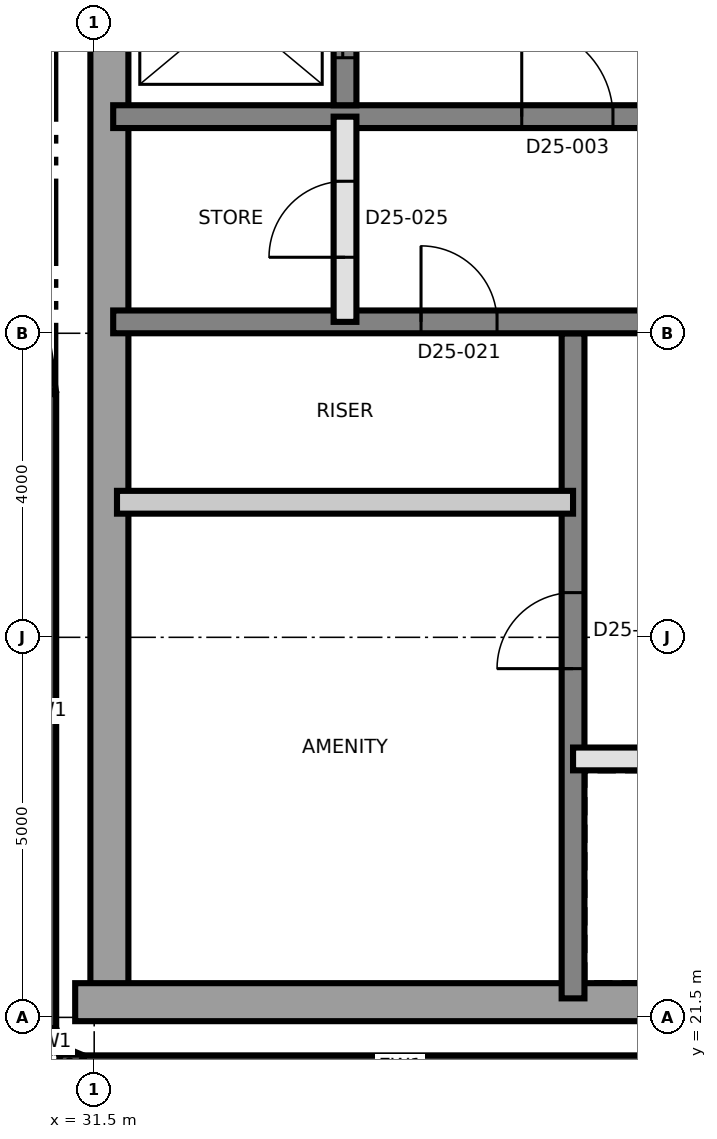
"""IFC4 building model, lengths in metres.
Left out: names, types, materials, properties, quantities, classifications, styles, units other than length and angle.
Written with IfcOpenShell. Run it as: python <this file> out.ifc"""

import sys

from ifc_helpers import new_model, si_unit, direction, frame, frame_2d, origin, place, context, subcontext, project, spatial, rectangle, extrude, element, fill, save


model = new_model("IFC4")
c1 = context("Model", 3, precision=1e-05, world=origin(), true_north=direction((0.0, 1.0)))
c2 = subcontext(c1, "Body", "Model", "MODEL_VIEW")
j1 = project(units=[si_unit("LENGTHUNIT", "METRE"), si_unit("PLANEANGLEUNIT", "RADIAN")], contexts=[c1])
p1 = place(None, origin())
s1 = spatial("IfcSite", under=j1, at=p1, CompositionType="ELEMENT")
p2 = place(p1, origin())
s2 = spatial("IfcBuilding", under=s1, at=p2, CompositionType="ELEMENT")
p3 = place(p2, frame((0.0, 0.0, 225.4)))
s3 = spatial("IfcBuildingStorey", under=s2, at=p3, CompositionType="ELEMENT", Elevation=225.4)
p4 = place(p3, frame((31.7, 21.75, 0.0), z_axis=(0.0, 0.0, 1.0), x_axis=(0.0, 1.0, 0.0)))
e1 = element("IfcWall", 1, at=p4, inside=s3, PredefinedType="SHEAR", context=c2, shape_type="SweptSolid", body=[
    extrude(rectangle(XDim=17.5, YDim=0.5, at=frame_2d((8.75, 0.0))), origin(), (0.0, 0.0, 1.0), 3.7),
])
p5 = place(p3, frame((31.25, 21.7, 0.0), z_axis=(0.0, 0.0, 1.0), x_axis=(1.0, 0.0, 0.0)))
e2 = element("IfcWall", 2, at=p5, inside=s3, PredefinedType="SHEAR", context=c2, shape_type="SweptSolid", body=[
    extrude(rectangle(XDim=27.0, YDim=0.5, at=frame_2d((13.5, 0.0))), origin(), (0.0, 0.0, 1.0), 3.7),
])
p6 = place(p3, frame((37.8, 21.75, 0.0), z_axis=(0.0, 0.0, 1.0), x_axis=(0.0, 1.0, 0.0)))
e3 = element("IfcWall", 3, at=p6, inside=s3, PredefinedType="SHEAR", context=c2, shape_type="SweptSolid", body=[
    extrude(rectangle(XDim=8.75, YDim=0.3, at=frame_2d((4.375, 0.0))), origin(), (0.0, 0.0, 1.0), 3.7),
])
p7 = place(p6, frame((4.338, 0.0, 0.0)))
e4 = element("IfcOpeningElement", 4, at=p7, cuts=e3, PredefinedType="OPENING", context=c2, shape_type="SweptSolid", body=[
    extrude(rectangle(XDim=1.0, YDim=2.1, at=frame_2d((0.5, 1.05))), frame((0.0, 0.16, 0.0), z_axis=(0.0, -1.0, 0.0), x_axis=(1.0, 0.0, 0.0)), (0.0, 0.0, 1.0), 0.32),
])
p8 = place(p3, frame((31.75, 30.65, 0.0), z_axis=(0.0, 0.0, 1.0), x_axis=(1.0, 0.0, 0.0)))
e5 = element("IfcWall", 5, at=p8, inside=s3, PredefinedType="SHEAR", context=c2, shape_type="SweptSolid", body=[
    extrude(rectangle(XDim=26.5, YDim=0.3, at=frame_2d((13.25, 0.0))), origin(), (0.0, 0.0, 1.0), 3.7),
])
p9 = place(p8, frame((24.75, 0.0, 0.0)))
e6 = element("IfcOpeningElement", 6, at=p9, cuts=e5, PredefinedType="OPENING", context=c2, shape_type="SweptSolid", body=[
    extrude(rectangle(XDim=1.0, YDim=2.1, at=frame_2d((0.5, 1.05))), frame((0.0, 0.16, 0.0), z_axis=(0.0, -1.0, 0.0), x_axis=(1.0, 0.0, 0.0)), (0.0, 0.0, 1.0), 0.32),
])
p10 = place(p8, frame((4.05, 0.0, 0.0)))
e7 = element("IfcOpeningElement", 7, at=p10, cuts=e5, PredefinedType="OPENING", context=c2, shape_type="SweptSolid", body=[
    extrude(rectangle(XDim=1.0, YDim=2.1, at=frame_2d((0.5, 1.05))), frame((0.0, 0.16, 0.0), z_axis=(0.0, -1.0, 0.0), x_axis=(1.0, 0.0, 0.0)), (0.0, 0.0, 1.0), 0.32),
])
p11 = place(p3, frame((31.75, 33.35, 0.0), z_axis=(0.0, 0.0, 1.0), x_axis=(1.0, 0.0, 0.0)))
e8 = element("IfcWall", 8, at=p11, inside=s3, PredefinedType="SHEAR", context=c2, shape_type="SweptSolid", body=[
    extrude(rectangle(XDim=26.5, YDim=0.3, at=frame_2d((13.25, 0.0))), origin(), (0.0, 0.0, 1.0), 3.7),
])
p12 = place(p11, frame((13.9, 0.0, 0.0)))
e9 = element("IfcOpeningElement", 9, at=p12, cuts=e8, PredefinedType="OPENING", context=c2, shape_type="SweptSolid", body=[
    extrude(rectangle(XDim=1.4, YDim=2.1, at=frame_2d((0.7, 1.05))), frame((0.0, 0.16, 0.0), z_axis=(0.0, -1.0, 0.0), x_axis=(1.0, 0.0, 0.0)), (0.0, 0.0, 1.0), 0.32),
])
p13 = place(p11, frame((5.375, 0.0, 0.0)))
e10 = element("IfcOpeningElement", 10, at=p13, cuts=e8, PredefinedType="OPENING", context=c2, shape_type="SweptSolid", body=[
    extrude(rectangle(XDim=1.2, YDim=2.1, at=frame_2d((0.6, 1.05))), frame((0.0, 0.16, 0.0), z_axis=(0.0, -1.0, 0.0), x_axis=(1.0, 0.0, 0.0)), (0.0, 0.0, 1.0), 0.32),
])
p14 = place(p11, frame((19.925, 0.0, 0.0)))
e11 = element("IfcOpeningElement", 11, at=p14, cuts=e8, PredefinedType="OPENING", context=c2, shape_type="SweptSolid", body=[
    extrude(rectangle(XDim=1.2, YDim=2.1, at=frame_2d((0.6, 1.05))), frame((0.0, 0.16, 0.0), z_axis=(0.0, -1.0, 0.0), x_axis=(1.0, 0.0, 0.0)), (0.0, 0.0, 1.0), 0.32),
])
p15 = place(p3, frame((34.8, 33.5, 0.0), z_axis=(0.0, 0.0, 1.0), x_axis=(0.0, 1.0, 0.0)))
e12 = element("IfcWall", 12, at=p15, inside=s3, PredefinedType="SHEAR", context=c2, shape_type="SweptSolid", body=[
    extrude(rectangle(XDim=2.55, YDim=0.3, at=frame_2d((1.275, 0.0))), origin(), (0.0, 0.0, 1.0), 3.7),
])
p16 = place(p15, frame((0.625, 0.0, 0.0)))
e13 = element("IfcOpeningElement", 13, at=p16, cuts=e12, PredefinedType="OPENING", context=c2, shape_type="SweptSolid", body=[
    extrude(rectangle(XDim=1.3, YDim=2.4, at=frame_2d((0.65, 1.2))), frame((0.0, 0.16, 0.0), z_axis=(0.0, -1.0, 0.0), x_axis=(1.0, 0.0, 0.0)), (0.0, 0.0, 1.0), 0.32),
])
p17 = place(p3, frame((30.85, 29.699, 0.0), z_axis=(0.0, 0.0, 1.0), x_axis=(0.0, -1.0, 0.0)))
e14 = element("IfcWall", 14, at=p17, inside=s3, PredefinedType="SOLIDWALL", context=c2, shape_type="SweptSolid", body=[
    extrude(rectangle(XDim=8.34, YDim=0.3, at=frame_2d((4.17, 0.0))), origin(), (0.0, 0.0, 1.0), 3.4),
])
for number, where, z_axis, x_axis in (
    (15, (30.861, 21.302, 0.0), (0.0, 0.0, 1.0), (0.383, -0.924, 0.0)),
    (16, (31.048, 20.967, 0.0), (0.0, 0.0, 1.0), (0.924, -0.383, 0.0)),
):
    element("IfcWall", number, at=place(p3, frame(where, z_axis=z_axis, x_axis=x_axis)), inside=s3, PredefinedType="SOLIDWALL", context=c2, shape_type="SweptSolid", body=[
        extrude(rectangle(XDim=0.275, YDim=0.3, at=frame_2d((0.138, 0.0))), origin(), (0.0, 0.0, 1.0), 3.4),
    ])
p18 = place(p3, frame((31.36, 20.85, 0.0), z_axis=(0.0, 0.0, 1.0), x_axis=(1.0, 0.0, 0.0)))
e17 = element("IfcWall", 17, at=p18, inside=s3, PredefinedType="SOLIDWALL", context=c2, shape_type="SweptSolid", body=[
    extrude(rectangle(XDim=8.34, YDim=0.3, at=frame_2d((4.17, 0.0))), origin(), (0.0, 0.0, 1.0), 3.4),
])
p19 = place(p3, frame((30.152, 34.0, 0.0), z_axis=(0.0, 0.0, 1.0), x_axis=(0.160697303067, -0.987003736967, 0.0)))
e18 = element("IfcWall", 18, at=p19, inside=s3, PredefinedType="SOLIDWALL", context=c2, shape_type="SweptSolid", body=[
    extrude(rectangle(XDim=4.333, YDim=0.3, at=frame_2d((2.167, 0.0))), origin(), (0.0, 0.0, 1.0), 3.4),
])
p20 = place(p19, frame((0.366, 0.0, 0.9)))
e19 = element("IfcOpeningElement", 19, at=p20, cuts=e18, PredefinedType="OPENING", context=c2, shape_type="SweptSolid", body=[
    extrude(rectangle(XDim=3.6, YDim=1.5, at=frame_2d((1.8, 0.75))), frame((0.0, 0.16, 0.0), z_axis=(0.0, -1.0, 0.0), x_axis=(1.0, 0.0, 0.0)), (0.0, 0.0, 1.0), 0.32),
])
p21 = place(p3, frame((37.8, 24.9, 0.0), z_axis=(0.0, 0.0, 1.0), x_axis=(1.0, 0.0, 0.0)))
e20 = element("IfcWall", 20, at=p21, inside=s3, PredefinedType="SOLIDWALL", context=c2, shape_type="SweptSolid", body=[
    extrude(rectangle(XDim=12.0, YDim=0.3, at=frame_2d((6.0, 0.0))), origin(), (0.0, 0.0, 1.0), 3.4),
])
p22 = place(p21, frame((1.05, 0.0, 0.0)))
e21 = element("IfcOpeningElement", 21, at=p22, cuts=e20, PredefinedType="OPENING", context=c2, shape_type="SweptSolid", body=[
    extrude(rectangle(XDim=0.9, YDim=2.1, at=frame_2d((0.45, 1.05))), frame((0.0, 0.16, 0.0), z_axis=(0.0, -1.0, 0.0), x_axis=(1.0, 0.0, 0.0)), (0.0, 0.0, 1.0), 0.32),
])
p23 = place(p21, frame((10.05, 0.0, 0.0)))
e22 = element("IfcOpeningElement", 22, at=p23, cuts=e20, PredefinedType="OPENING", context=c2, shape_type="SweptSolid", body=[
    extrude(rectangle(XDim=0.9, YDim=2.1, at=frame_2d((0.45, 1.05))), frame((0.0, 0.16, 0.0), z_axis=(0.0, -1.0, 0.0), x_axis=(1.0, 0.0, 0.0)), (0.0, 0.0, 1.0), 0.32),
])
p24 = place(p21, frame((3.95, 0.0, 0.0)))
e23 = element("IfcOpeningElement", 23, at=p24, cuts=e20, PredefinedType="OPENING", context=c2, shape_type="SweptSolid", body=[
    extrude(rectangle(XDim=1.1, YDim=2.4, at=frame_2d((0.55, 1.2))), frame((0.0, 0.16, 0.0), z_axis=(0.0, -1.0, 0.0), x_axis=(1.0, 0.0, 0.0)), (0.0, 0.0, 1.0), 0.32),
])
p25 = place(p21, frame((6.95, 0.0, 0.0)))
e24 = element("IfcOpeningElement", 24, at=p25, cuts=e20, PredefinedType="OPENING", context=c2, shape_type="SweptSolid", body=[
    extrude(rectangle(XDim=1.1, YDim=2.4, at=frame_2d((0.55, 1.2))), frame((0.0, 0.16, 0.0), z_axis=(0.0, -1.0, 0.0), x_axis=(1.0, 0.0, 0.0)), (0.0, 0.0, 1.0), 0.32),
])
p26 = place(p3, frame((31.8, 28.277, 0.0), z_axis=(0.0, 0.0, 1.0), x_axis=(1.0, 0.0, 0.0)))
e25 = element("IfcWall", 25, at=p26, inside=s3, PredefinedType="PARTITIONING", context=c2, shape_type="SweptSolid", body=[
    extrude(rectangle(XDim=6.0, YDim=0.3, at=frame_2d((3.0, 0.0))), origin(), (0.0, 0.0, 1.0), 3.4),
])
p27 = place(p3, frame((34.8, 30.65, 0.0), z_axis=(0.0, 0.0, 1.0), x_axis=(0.0, 1.0, 0.0)))
e26 = element("IfcWall", 26, at=p27, inside=s3, PredefinedType="SOLIDWALL", context=c2, shape_type="SweptSolid", body=[
    extrude(rectangle(XDim=2.7, YDim=0.3, at=frame_2d((1.35, 0.0))), origin(), (0.0, 0.0, 1.0), 3.4),
])
p28 = place(p27, frame((0.85, 0.0, 0.0)))
e27 = element("IfcOpeningElement", 27, at=p28, cuts=e26, PredefinedType="OPENING", context=c2, shape_type="SweptSolid", body=[
    extrude(rectangle(XDim=1.0, YDim=2.1, at=frame_2d((0.5, 1.05))), frame((0.0, 0.16, 0.0), z_axis=(0.0, -1.0, 0.0), x_axis=(1.0, 0.0, 0.0)), (0.0, 0.0, 1.0), 0.32),
])
p29 = place(p13, origin())
e28 = element("IfcDoor", 28, at=p29, inside=s3, OperationType="SINGLE_SWING_LEFT", PredefinedType="DOOR", context=c2, shape_type="SweptSolid", body=[
    extrude(rectangle(XDim=1.2, YDim=2.1, at=frame_2d((0.6, 1.05))), frame((0.0, 0.025, 0.0), z_axis=(0.0, -1.0, 0.0), x_axis=(1.0, 0.0, 0.0)), (0.0, 0.0, 1.0), 0.05),
])
fill(e10, e28)
p30 = place(p16, origin())
e29 = element("IfcDoor", 29, at=p30, inside=s3, OperationType="SLIDING_TO_LEFT", PredefinedType="DOOR", context=c2, shape_type="SweptSolid", body=[
    extrude(rectangle(XDim=1.3, YDim=2.4, at=frame_2d((0.65, 1.2))), frame((0.0, 0.025, 0.0), z_axis=(0.0, -1.0, 0.0), x_axis=(1.0, 0.0, 0.0)), (0.0, 0.0, 1.0), 0.05),
])
fill(e13, e29)
p31 = place(p10, origin())
e30 = element("IfcDoor", 30, at=p31, inside=s3, OperationType="SINGLE_SWING_LEFT", PredefinedType="DOOR", context=c2, shape_type="SweptSolid", body=[
    extrude(rectangle(XDim=1.0, YDim=2.1, at=frame_2d((0.5, 1.05))), frame((0.0, 0.025, 0.0), z_axis=(0.0, -1.0, 0.0), x_axis=(1.0, 0.0, 0.0)), (0.0, 0.0, 1.0), 0.05),
])
fill(e7, e30)
p32 = place(p7, origin())
e31 = element("IfcDoor", 31, at=p32, inside=s3, OperationType="SINGLE_SWING_RIGHT", PredefinedType="DOOR", context=c2, shape_type="SweptSolid", body=[
    extrude(rectangle(XDim=1.0, YDim=2.1, at=frame_2d((0.5, 1.05))), frame((0.0, 0.025, 0.0), z_axis=(0.0, -1.0, 0.0), x_axis=(1.0, 0.0, 0.0)), (0.0, 0.0, 1.0), 0.05),
])
fill(e4, e31)
p33 = place(p28, origin())
e32 = element("IfcDoor", 32, at=p33, inside=s3, OperationType="SINGLE_SWING_LEFT", PredefinedType="DOOR", context=c2, shape_type="SweptSolid", body=[
    extrude(rectangle(XDim=1.0, YDim=2.1, at=frame_2d((0.5, 1.05))), frame((0.0, 0.025, 0.0), z_axis=(0.0, -1.0, 0.0), x_axis=(1.0, 0.0, 0.0)), (0.0, 0.0, 1.0), 0.05),
])
fill(e27, e32)
save(model, sys.argv[1])
